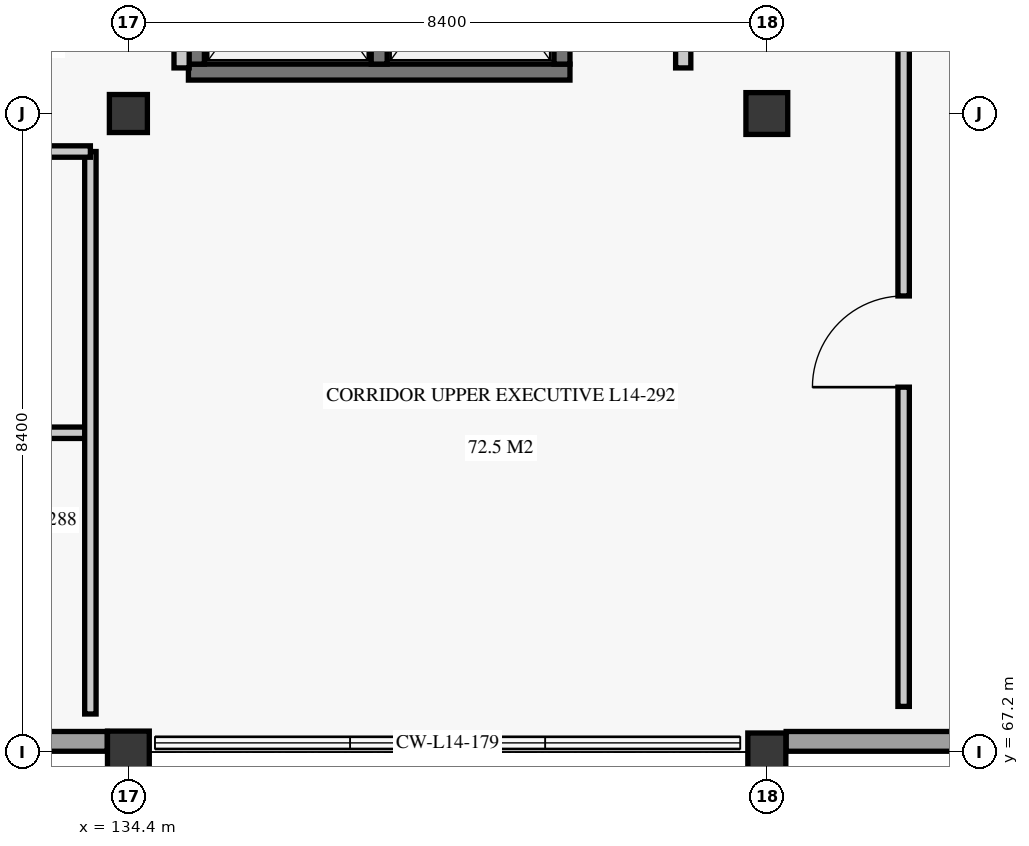
"""IFC4 building model, lengths in metres.
Left out: names, types, materials, properties, quantities, classifications, styles, units other than length and angle.
Written with IfcOpenShell. Run it as: python <this file> out.ifc"""

import sys

from ifc_helpers import new_model, si_unit, direction, frame, frame_2d, origin, origin_2d, place, context, subcontext, project, spatial, rectangle, extrude, element, fill, save


model = new_model("IFC4")
c1 = context("Model", 3, precision=1e-05, world=origin(), true_north=direction((0.0, 1.0)))
c2 = subcontext(c1, "Body", "Model", "MODEL_VIEW")
j1 = project(units=[si_unit("LENGTHUNIT", "METRE"), si_unit("PLANEANGLEUNIT", "RADIAN")], contexts=[c1])
p1 = place(None, origin())
s1 = spatial("IfcSite", under=j1, at=p1, CompositionType="ELEMENT")
p2 = place(p1, origin())
s2 = spatial("IfcBuilding", under=s1, at=p2, CompositionType="ELEMENT")
p3 = place(p2, frame((0.0, 0.0, 58.7)))
s3 = spatial("IfcBuildingStorey", under=s2, at=p3, CompositionType="ELEMENT", Elevation=58.7)
p4 = place(p3, frame((134.4, 67.2, 0.0), z_axis=(0.0, 0.0, 1.0), x_axis=(1.0, 0.0, 0.0)))
e1 = element("IfcColumn", 1, at=p4, inside=s3, PredefinedType="COLUMN", context=c2, shape_type="SweptSolid", body=[
    extrude(rectangle(XDim=0.55, YDim=0.55, at=origin_2d()), origin(), (0.0, 0.0, 1.0), 3.72),
])
for number, where, z_axis, x_axis in (
    (2, (134.4, 75.6, 0.0), (0.0, 0.0, 1.0), (1.0, 0.0, 0.0)),
    (3, (142.8, 67.2, 0.0), (0.0, 0.0, 1.0), (1.0, 0.0, 0.0)),
):
    element("IfcColumn", number, at=place(p3, frame(where, z_axis=z_axis, x_axis=x_axis)), inside=s3, PredefinedType="COLUMN", context=c2, shape_type="SweptSolid", body=[
        extrude(rectangle(XDim=0.5, YDim=0.5, at=origin_2d()), origin(), (0.0, 0.0, 1.0), 3.72),
    ])
p5 = place(p3, frame((142.8, 75.6, 0.0), z_axis=(0.0, 0.0, 1.0), x_axis=(1.0, 0.0, 0.0)))
e4 = element("IfcColumn", 4, at=p5, inside=s3, PredefinedType="COLUMN", context=c2, shape_type="SweptSolid", body=[
    extrude(rectangle(XDim=0.55, YDim=0.55, at=origin_2d()), origin(), (0.0, 0.0, 1.0), 3.72),
])
p6 = place(p3, frame((126.254, 67.34, 0.0), z_axis=(0.0, 0.0, 1.0), x_axis=(1.0, 0.0, 0.0)))
e5 = element("IfcWall", 5, at=p6, inside=s3, PredefinedType="SOLIDWALL", context=c2, shape_type="SweptSolid", body=[
    extrude(rectangle(XDim=7.868, YDim=0.26, at=frame_2d((3.934, 0.0))), origin(), (0.0, 0.0, 1.0), 3.04),
])
p7 = place(p6, frame((2.096, 0.0, 0.85)))
e6 = element("IfcOpeningElement", 6, at=p7, cuts=e5, PredefinedType="OPENING", context=c2, shape_type="SweptSolid", body=[
    extrude(rectangle(XDim=3.7, YDim=1.9, at=frame_2d((1.85, 0.95))), frame((0.0, 0.14, 0.0), z_axis=(0.0, -1.0, 0.0), x_axis=(1.0, 0.0, 0.0)), (0.0, 0.0, 1.0), 0.28),
])
p8 = place(p3, frame((143.054, 67.34, 0.0), z_axis=(0.0, 0.0, 1.0), x_axis=(1.0, 0.0, 0.0)))
e7 = element("IfcWall", 7, at=p8, inside=s3, PredefinedType="SOLIDWALL", context=c2, shape_type="SweptSolid", body=[
    extrude(rectangle(XDim=7.868, YDim=0.26, at=frame_2d((3.934, 0.0))), origin(), (0.0, 0.0, 1.0), 3.04),
])
p9 = place(p8, frame((2.996, 0.0, 0.85)))
e8 = element("IfcOpeningElement", 8, at=p9, cuts=e7, PredefinedType="OPENING", context=c2, shape_type="SweptSolid", body=[
    extrude(rectangle(XDim=1.9, YDim=1.75, at=frame_2d((0.95, 0.875))), frame((0.0, 0.14, 0.0), z_axis=(0.0, -1.0, 0.0), x_axis=(1.0, 0.0, 0.0)), (0.0, 0.0, 1.0), 0.28),
])
p10 = place(p3, frame((135.19, 76.145, 0.0), z_axis=(0.0, 0.0, 1.0), x_axis=(1.0, 0.0, 0.0)))
e9 = element("IfcWall", 9, at=p10, inside=s3, PredefinedType="SHEAR", context=c2, shape_type="SweptSolid", body=[
    extrude(rectangle(XDim=5.02, YDim=0.21, at=frame_2d((2.51, 0.0))), origin(), (0.0, 0.0, 1.0), 3.72),
])
for number, where, z_axis, x_axis in (
    (10, (135.295, 76.25, 0.0), (0.0, 0.0, 1.0), (0.0, 1.0, 0.0)),
    (11, (140.105, 76.25, 0.0), (0.0, 0.0, 1.0), (0.0, 1.0, 0.0)),
    (12, (137.7, 76.25, 0.0), (0.0, 0.0, 1.0), (0.0, 1.0, 0.0)),
):
    element("IfcWall", number, at=place(p3, frame(where, z_axis=z_axis, x_axis=x_axis)), inside=s3, PredefinedType="SHEAR", context=c2, shape_type="SweptSolid", body=[
        extrude(rectangle(XDim=3.0, YDim=0.21, at=frame_2d((1.5, 0.0))), origin(), (0.0, 0.0, 1.0), 3.72),
    ])
for number, where, z_axis, x_axis in (
    (13, (135.1, 76.2, 0.0), (0.0, 0.0, 1.0), (0.0, 1.0, 0.0)),
    (14, (141.7, 76.2, 0.0), (0.0, 0.0, 1.0), (0.0, 1.0, 0.0)),
):
    element("IfcWall", number, at=place(p3, frame(where, z_axis=z_axis, x_axis=x_axis)), inside=s3, PredefinedType="PARTITIONING", context=c2, shape_type="SweptSolid", body=[
        extrude(rectangle(XDim=7.25, YDim=0.2, at=frame_2d((3.625, 0.0))), origin(), (0.0, 0.0, 1.0), 3.34),
    ])
p11 = place(p3, frame((129.1, 71.4, 0.0), z_axis=(0.0, 0.0, 1.0), x_axis=(1.0, 0.0, 0.0)))
e15 = element("IfcWall", 15, at=p11, inside=s3, PredefinedType="PARTITIONING", context=c2, shape_type="SweptSolid", body=[
    extrude(rectangle(XDim=4.8, YDim=0.15, at=frame_2d((2.4, 0.0))), origin(), (0.0, 0.0, 1.0), 3.34),
])
p12 = place(p3, frame((133.9, 67.7, 0.0), z_axis=(0.0, 0.0, 1.0), x_axis=(0.0, 1.0, 0.0)))
e16 = element("IfcWall", 16, at=p12, inside=s3, PredefinedType="PARTITIONING", context=c2, shape_type="SweptSolid", body=[
    extrude(rectangle(XDim=7.4, YDim=0.15, at=frame_2d((3.7, 0.0))), origin(), (0.0, 0.0, 1.0), 3.34),
])
p13 = place(p3, frame((129.1, 75.1, 0.0), z_axis=(0.0, 0.0, 1.0), x_axis=(1.0, 0.0, 0.0)))
e17 = element("IfcWall", 17, at=p13, inside=s3, PredefinedType="PARTITIONING", context=c2, shape_type="SweptSolid", body=[
    extrude(rectangle(XDim=4.8, YDim=0.15, at=frame_2d((2.4, 0.0))), origin(), (0.0, 0.0, 1.0), 3.34),
])
p14 = place(p3, frame((144.6, 67.8, 0.0), z_axis=(0.0, 0.0, 1.0), x_axis=(0.0, 1.0, 0.0)))
e18 = element("IfcWall", 18, at=p14, inside=s3, PredefinedType="PARTITIONING", context=c2, shape_type="SweptSolid", body=[
    extrude(rectangle(XDim=24.2, YDim=0.15, at=frame_2d((12.1, 0.0))), origin(), (0.0, 0.0, 1.0), 3.34),
])
p15 = place(p14, frame((4.2, 0.0, 0.0)))
e19 = element("IfcOpeningElement", 19, at=p15, cuts=e18, PredefinedType="OPENING", context=c2, shape_type="SweptSolid", body=[
    extrude(rectangle(XDim=1.2, YDim=2.3, at=frame_2d((0.6, 1.15))), frame((0.0, 0.085, 0.0), z_axis=(0.0, -1.0, 0.0), x_axis=(1.0, 0.0, 0.0)), (0.0, 0.0, 1.0), 0.17),
])
p16 = place(p14, frame((19.6, 0.0, 0.0)))
e20 = element("IfcOpeningElement", 20, at=p16, cuts=e18, PredefinedType="OPENING", context=c2, shape_type="SweptSolid", body=[
    extrude(rectangle(XDim=1.2, YDim=2.3, at=frame_2d((0.6, 1.15))), frame((0.0, 0.085, 0.0), z_axis=(0.0, -1.0, 0.0), x_axis=(1.0, 0.0, 0.0)), (0.0, 0.0, 1.0), 0.17),
])
p17 = place(p15, origin())
e21 = element("IfcDoor", 21, at=p17, inside=s3, OperationType="SINGLE_SWING_LEFT", PredefinedType="DOOR", context=c2, shape_type="SweptSolid", body=[
    extrude(rectangle(XDim=1.2, YDim=2.3, at=frame_2d((0.6, 1.15))), frame((0.0, 0.025, 0.0), z_axis=(0.0, -1.0, 0.0), x_axis=(1.0, 0.0, 0.0)), (0.0, 0.0, 1.0), 0.05),
])
fill(e19, e21)
save(model, sys.argv[1])
